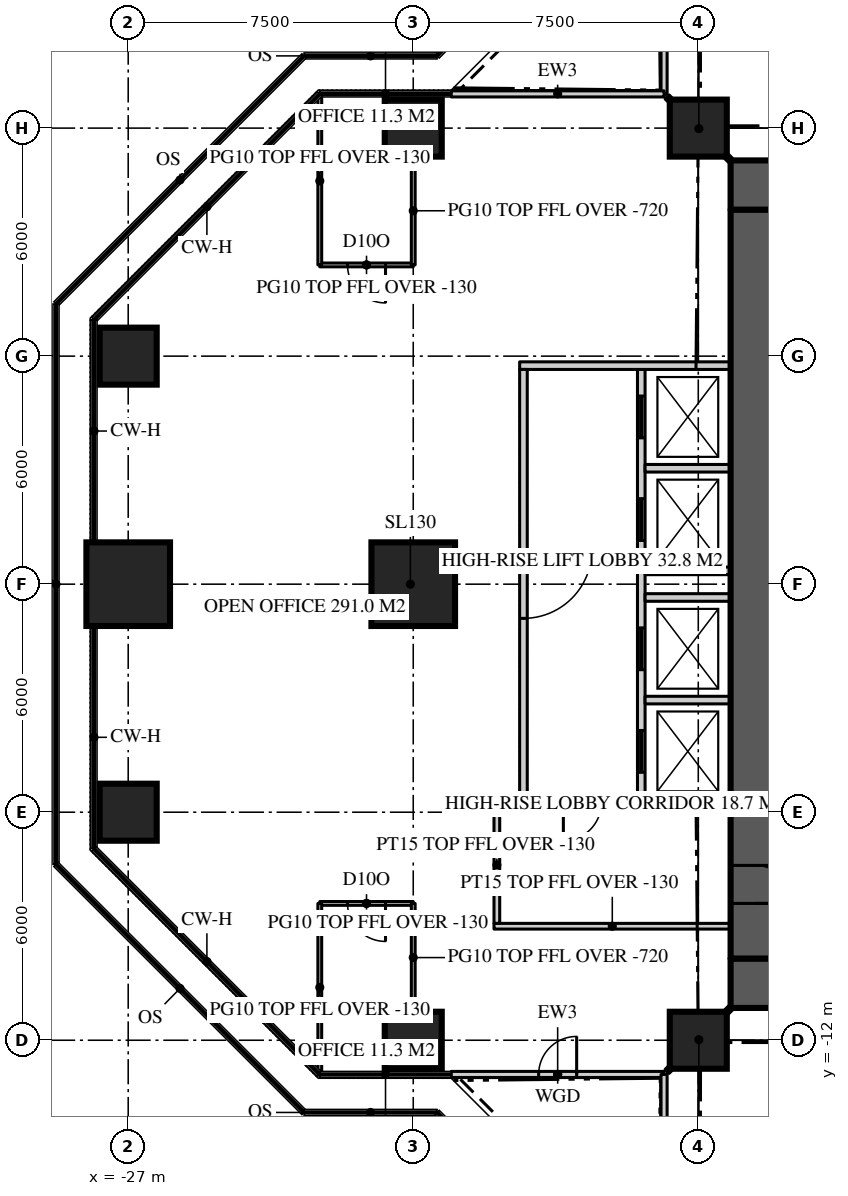
"""IFC4 building model, lengths in metres.
Left out: names, types, materials, properties, quantities, classifications, styles, units other than length and angle.
Written with IfcOpenShell. Run it as: python <this file> out.ifc"""

import sys

from ifc_helpers import new_model, si_unit, direction, frame, frame_2d, origin, origin_2d, place, context, subcontext, project, spatial, rectangle, extrude, element, fill, save


model = new_model("IFC4")
c1 = context("Model", 3, precision=1e-05, world=origin(), true_north=direction((0.0, 1.0)))
c2 = subcontext(c1, "Body", "Model", "MODEL_VIEW")
j1 = project(units=[si_unit("LENGTHUNIT", "METRE"), si_unit("PLANEANGLEUNIT", "RADIAN")], contexts=[c1])
p1 = place(None, origin())
s1 = spatial("IfcSite", under=j1, at=p1, CompositionType="ELEMENT")
p2 = place(p1, origin())
s2 = spatial("IfcBuilding", under=s1, at=p2, CompositionType="ELEMENT")
p3 = place(p2, frame((0.0, 0.0, 208.8)))
s3 = spatial("IfcBuildingStorey", under=s2, at=p3, CompositionType="ELEMENT", Elevation=208.8)
p4 = place(p3, frame((-11.15, 10.5, 0.0), z_axis=(0.0, 0.0, 1.0), x_axis=(1.0, 0.0, 0.0)))
e1 = element("IfcWall", 1, at=p4, inside=s3, PredefinedType="SHEAR", context=c2, shape_type="SweptSolid", body=[
    extrude(rectangle(XDim=22.3, YDim=1.3, at=frame_2d((11.15, 0.0))), origin(), (0.0, 0.0, 1.0), 3.9),
])
p5 = place(p4, frame((4.25, 0.0, 0.0)))
e2 = element("IfcOpeningElement", 2, at=p5, cuts=e1, PredefinedType="OPENING", context=c2, shape_type="SweptSolid", body=[
    extrude(rectangle(XDim=1.8, YDim=2.2, at=frame_2d((0.9, 1.1))), frame((0.0, 0.66, 0.0), z_axis=(0.0, -1.0, 0.0), x_axis=(1.0, 0.0, 0.0)), (0.0, 0.0, 1.0), 1.32),
])
p6 = place(p4, frame((16.25, 0.0, 0.0)))
e3 = element("IfcOpeningElement", 3, at=p6, cuts=e1, PredefinedType="OPENING", context=c2, shape_type="SweptSolid", body=[
    extrude(rectangle(XDim=1.8, YDim=2.2, at=frame_2d((0.9, 1.1))), frame((0.0, 0.66, 0.0), z_axis=(0.0, -1.0, 0.0), x_axis=(1.0, 0.0, 0.0)), (0.0, 0.0, 1.0), 1.32),
])
p7 = place(p3, frame((11.15, -10.5, 0.0), z_axis=(0.0, 0.0, 1.0), x_axis=(-1.0, 0.0, 0.0)))
e4 = element("IfcWall", 4, at=p7, inside=s3, PredefinedType="SHEAR", context=c2, shape_type="SweptSolid", body=[
    extrude(rectangle(XDim=22.3, YDim=1.3, at=frame_2d((11.15, 0.0))), origin(), (0.0, 0.0, 1.0), 3.9),
])
p8 = place(p7, frame((16.25, 0.0, 0.0)))
e5 = element("IfcOpeningElement", 5, at=p8, cuts=e4, PredefinedType="OPENING", context=c2, shape_type="SweptSolid", body=[
    extrude(rectangle(XDim=1.8, YDim=2.2, at=frame_2d((0.9, 1.1))), frame((0.0, 0.66, 0.0), z_axis=(0.0, -1.0, 0.0), x_axis=(1.0, 0.0, 0.0)), (0.0, 0.0, 1.0), 1.32),
])
p9 = place(p7, frame((4.25, 0.0, 0.0)))
e6 = element("IfcOpeningElement", 6, at=p9, cuts=e4, PredefinedType="OPENING", context=c2, shape_type="SweptSolid", body=[
    extrude(rectangle(XDim=1.8, YDim=2.2, at=frame_2d((0.9, 1.1))), frame((0.0, 0.66, 0.0), z_axis=(0.0, -1.0, 0.0), x_axis=(1.0, 0.0, 0.0)), (0.0, 0.0, 1.0), 1.32),
])
p10 = place(p3, frame((-10.5, 9.85, 0.0), z_axis=(0.0, 0.0, 1.0), x_axis=(0.0, -1.0, 0.0)))
e7 = element("IfcWall", 7, at=p10, inside=s3, PredefinedType="SHEAR", context=c2, shape_type="SweptSolid", body=[
    extrude(rectangle(XDim=19.7, YDim=1.3, at=frame_2d((9.85, 0.0))), origin(), (0.0, 0.0, 1.0), 3.9),
])
p11 = place(p10, frame((17.25, 0.0, 0.0)))
e8 = element("IfcOpeningElement", 8, at=p11, cuts=e7, PredefinedType="OPENING", context=c2, shape_type="SweptSolid", body=[
    extrude(rectangle(XDim=1.0, YDim=2.2, at=frame_2d((0.5, 1.1))), frame((0.0, 0.66, 0.0), z_axis=(0.0, -1.0, 0.0), x_axis=(1.0, 0.0, 0.0)), (0.0, 0.0, 1.0), 1.32),
])
for number, where, z_axis, x_axis in (
    (9, (-19.5, -12.0, 0.0), (0.0, 0.0, 1.0), (1.0, 0.0, 0.0)),
    (10, (-12.0, -12.0, 0.0), (0.0, 0.0, 1.0), (1.0, 0.0, 0.0)),
    (11, (-27.0, -6.0, 0.0), (0.0, 0.0, 1.0), (1.0, 0.0, 0.0)),
):
    element("IfcColumn", number, at=place(p3, frame(where, z_axis=z_axis, x_axis=x_axis)), inside=s3, PredefinedType="COLUMN", context=c2, shape_type="SweptSolid", body=[
        extrude(rectangle(XDim=1.5, YDim=1.5, at=origin_2d()), origin(), (0.0, 0.0, 1.0), 3.9),
    ])
for number, where, z_axis, x_axis in (
    (12, (-27.0, 0.0, 0.0), (0.0, 0.0, 1.0), (1.0, 0.0, 0.0)),
    (13, (-19.5, 0.0, 0.0), (0.0, 0.0, 1.0), (1.0, 0.0, 0.0)),
):
    element("IfcColumn", number, at=place(p3, frame(where, z_axis=z_axis, x_axis=x_axis)), inside=s3, PredefinedType="COLUMN", context=c2, shape_type="SweptSolid", body=[
        extrude(rectangle(XDim=2.2, YDim=2.2, at=origin_2d()), origin(), (0.0, 0.0, 1.0), 3.9),
    ])
for number, where, z_axis, x_axis in (
    (14, (-27.0, 6.0, 0.0), (0.0, 0.0, 1.0), (1.0, 0.0, 0.0)),
    (15, (-19.5, 12.0, 0.0), (0.0, 0.0, 1.0), (1.0, 0.0, 0.0)),
    (16, (-12.0, 12.0, 0.0), (0.0, 0.0, 1.0), (1.0, 0.0, 0.0)),
):
    element("IfcColumn", number, at=place(p3, frame(where, z_axis=z_axis, x_axis=x_axis)), inside=s3, PredefinedType="COLUMN", context=c2, shape_type="SweptSolid", body=[
        extrude(rectangle(XDim=1.5, YDim=1.5, at=origin_2d()), origin(), (0.0, 0.0, 1.0), 3.9),
    ])
p12 = place(p3, frame((-12.9, 18.5, 0.0), z_axis=(0.0, 0.0, 1.0), x_axis=(0.0, -1.0, 0.0)))
e17 = element("IfcWall", 17, at=p12, inside=s3, PredefinedType="SOLIDWALL", context=c2, shape_type="SweptSolid", body=[
    extrude(rectangle(XDim=5.6, YDim=0.16, at=frame_2d((2.8, 0.0))), origin(), (0.0, 0.0, 1.0), 3.77),
])
p13 = place(p12, frame((2.3, 0.0, 0.0)))
e18 = element("IfcOpeningElement", 18, at=p13, cuts=e17, PredefinedType="OPENING", context=c2, shape_type="SweptSolid", body=[
    extrude(rectangle(XDim=1.0, YDim=2.2, at=frame_2d((0.5, 1.1))), frame((0.0, 0.09, 0.0), z_axis=(0.0, -1.0, 0.0), x_axis=(1.0, 0.0, 0.0)), (0.0, 0.0, 1.0), 0.18),
])
p14 = place(p3, frame((-12.9, 12.9, 0.0), z_axis=(0.0, 0.0, 1.0), x_axis=(-1.0, 0.0, 0.0)))
e19 = element("IfcWall", 19, at=p14, inside=s3, PredefinedType="SOLIDWALL", context=c2, shape_type="SweptSolid", body=[
    extrude(rectangle(XDim=5.6, YDim=0.16, at=frame_2d((2.8, 0.0))), origin(), (0.0, 0.0, 1.0), 3.77),
])
p15 = place(p3, frame((-18.5, -12.9, 0.0), z_axis=(0.0, 0.0, 1.0), x_axis=(1.0, 0.0, 0.0)))
e20 = element("IfcWall", 20, at=p15, inside=s3, PredefinedType="SOLIDWALL", context=c2, shape_type="SweptSolid", body=[
    extrude(rectangle(XDim=5.6, YDim=0.16, at=frame_2d((2.8, 0.0))), origin(), (0.0, 0.0, 1.0), 3.77),
])
p16 = place(p15, frame((2.3, 0.0, 0.0)))
e21 = element("IfcOpeningElement", 21, at=p16, cuts=e20, PredefinedType="OPENING", context=c2, shape_type="SweptSolid", body=[
    extrude(rectangle(XDim=1.0, YDim=2.2, at=frame_2d((0.5, 1.1))), frame((0.0, 0.09, 0.0), z_axis=(0.0, -1.0, 0.0), x_axis=(1.0, 0.0, 0.0)), (0.0, 0.0, 1.0), 0.18),
])
p17 = place(p3, frame((-12.9, -12.9, 0.0), z_axis=(0.0, 0.0, 1.0), x_axis=(0.0, -1.0, 0.0)))
e22 = element("IfcWall", 22, at=p17, inside=s3, PredefinedType="SOLIDWALL", context=c2, shape_type="SweptSolid", body=[
    extrude(rectangle(XDim=5.6, YDim=0.16, at=frame_2d((2.8, 0.0))), origin(), (0.0, 0.0, 1.0), 3.77),
])
p18 = place(p3, frame((-19.5, -8.4, 0.0), z_axis=(0.0, 0.0, 1.0), x_axis=(-1.0, 0.0, 0.0)))
e23 = element("IfcWall", 23, at=p18, inside=s3, PredefinedType="PARTITIONING", context=c2, shape_type="SweptSolid", body=[
    extrude(rectangle(XDim=2.459, YDim=0.1, at=frame_2d((1.229, 0.0))), origin(), (0.0, 0.0, 1.0), 3.77),
])
p19 = place(p18, frame((0.729, 0.0, 0.0)))
e24 = element("IfcOpeningElement", 24, at=p19, cuts=e23, PredefinedType="OPENING", context=c2, shape_type="SweptSolid", body=[
    extrude(rectangle(XDim=1.0, YDim=2.2, at=frame_2d((0.5, 1.1))), frame((0.0, 0.06, 0.0), z_axis=(0.0, -1.0, 0.0), x_axis=(1.0, 0.0, 0.0)), (0.0, 0.0, 1.0), 0.12),
])
p20 = place(p3, frame((-19.5, -8.4, 0.0), z_axis=(0.0, 0.0, 1.0), x_axis=(0.0, -1.0, 0.0)))
e25 = element("IfcWall", 25, at=p20, inside=s3, PredefinedType="PARTITIONING", context=c2, shape_type="SweptSolid", body=[
    extrude(rectangle(XDim=2.85, YDim=0.1, at=frame_2d((1.425, 0.0))), origin(), (0.0, 0.0, 1.0), 3.18),
])
p21 = place(p3, frame((-21.959, -8.4, 0.0), z_axis=(0.0, 0.0, 1.0), x_axis=(0.0, -1.0, 0.0)))
e26 = element("IfcWall", 26, at=p21, inside=s3, PredefinedType="PARTITIONING", context=c2, shape_type="SweptSolid", body=[
    extrude(rectangle(XDim=4.42, YDim=0.1, at=frame_2d((2.21, 0.0))), origin(), (0.0, 0.0, 1.0), 3.77),
])
p22 = place(p3, frame((-19.5, 8.4, 0.0), z_axis=(0.0, 0.0, 1.0), x_axis=(-1.0, 0.0, 0.0)))
e27 = element("IfcWall", 27, at=p22, inside=s3, PredefinedType="PARTITIONING", context=c2, shape_type="SweptSolid", body=[
    extrude(rectangle(XDim=2.459, YDim=0.1, at=frame_2d((1.229, 0.0))), origin(), (0.0, 0.0, 1.0), 3.77),
])
p23 = place(p22, frame((0.729, 0.0, 0.0)))
e28 = element("IfcOpeningElement", 28, at=p23, cuts=e27, PredefinedType="OPENING", context=c2, shape_type="SweptSolid", body=[
    extrude(rectangle(XDim=1.0, YDim=2.2, at=frame_2d((0.5, 1.1))), frame((0.0, 0.06, 0.0), z_axis=(0.0, -1.0, 0.0), x_axis=(1.0, 0.0, 0.0)), (0.0, 0.0, 1.0), 0.12),
])
p24 = place(p3, frame((-19.5, 8.4, 0.0), z_axis=(0.0, 0.0, 1.0), x_axis=(0.0, 1.0, 0.0)))
e29 = element("IfcWall", 29, at=p24, inside=s3, PredefinedType="PARTITIONING", context=c2, shape_type="SweptSolid", body=[
    extrude(rectangle(XDim=2.85, YDim=0.1, at=frame_2d((1.425, 0.0))), origin(), (0.0, 0.0, 1.0), 3.18),
])
p25 = place(p3, frame((-21.959, 8.4, 0.0), z_axis=(0.0, 0.0, 1.0), x_axis=(0.0, 1.0, 0.0)))
e30 = element("IfcWall", 30, at=p25, inside=s3, PredefinedType="PARTITIONING", context=c2, shape_type="SweptSolid", body=[
    extrude(rectangle(XDim=4.42, YDim=0.1, at=frame_2d((2.21, 0.0))), origin(), (0.0, 0.0, 1.0), 3.77),
])
p26 = place(p3, frame((-13.5, 5.65, 0.0), z_axis=(0.0, 0.0, 1.0), x_axis=(0.0, -1.0, 0.0)))
e31 = element("IfcWall", 31, at=p26, inside=s3, PredefinedType="SOLIDWALL", context=c2, shape_type="SweptSolid", body=[
    extrude(rectangle(XDim=11.3, YDim=0.2, at=frame_2d((5.65, 0.0))), origin(), (0.0, 0.0, 1.0), 3.7),
])
p27 = place(p26, frame((0.7, 0.0, 0.0)))
e32 = element("IfcOpeningElement", 32, at=p27, cuts=e31, PredefinedType="OPENING", context=c2, shape_type="SweptSolid", body=[
    extrude(rectangle(XDim=1.1, YDim=2.2, at=frame_2d((0.55, 1.1))), frame((0.0, 0.11, 0.0), z_axis=(0.0, -1.0, 0.0), x_axis=(1.0, 0.0, 0.0)), (0.0, 0.0, 1.0), 0.22),
])
p28 = place(p26, frame((3.4, 0.0, 0.0)))
e33 = element("IfcOpeningElement", 33, at=p28, cuts=e31, PredefinedType="OPENING", context=c2, shape_type="SweptSolid", body=[
    extrude(rectangle(XDim=1.1, YDim=2.2, at=frame_2d((0.55, 1.1))), frame((0.0, 0.11, 0.0), z_axis=(0.0, -1.0, 0.0), x_axis=(1.0, 0.0, 0.0)), (0.0, 0.0, 1.0), 0.22),
])
p29 = place(p26, frame((6.8, 0.0, 0.0)))
e34 = element("IfcOpeningElement", 34, at=p29, cuts=e31, PredefinedType="OPENING", context=c2, shape_type="SweptSolid", body=[
    extrude(rectangle(XDim=1.1, YDim=2.2, at=frame_2d((0.55, 1.1))), frame((0.0, 0.11, 0.0), z_axis=(0.0, -1.0, 0.0), x_axis=(1.0, 0.0, 0.0)), (0.0, 0.0, 1.0), 0.22),
])
p30 = place(p26, frame((9.5, 0.0, 0.0)))
e35 = element("IfcOpeningElement", 35, at=p30, cuts=e31, PredefinedType="OPENING", context=c2, shape_type="SweptSolid", body=[
    extrude(rectangle(XDim=1.1, YDim=2.2, at=frame_2d((0.55, 1.1))), frame((0.0, 0.11, 0.0), z_axis=(0.0, -1.0, 0.0), x_axis=(1.0, 0.0, 0.0)), (0.0, 0.0, 1.0), 0.22),
])
p31 = place(p3, frame((-11.15, 5.75, 0.0), z_axis=(0.0, 0.0, 1.0), x_axis=(-1.0, 0.0, 0.0)))
e36 = element("IfcWall", 36, at=p31, inside=s3, PredefinedType="SOLIDWALL", context=c2, shape_type="SweptSolid", body=[
    extrude(rectangle(XDim=5.55, YDim=0.2, at=frame_2d((2.775, 0.0))), origin(), (0.0, 0.0, 1.0), 3.7),
])
p32 = place(p3, frame((-11.15, -5.75, 0.0), z_axis=(0.0, 0.0, 1.0), x_axis=(-1.0, 0.0, 0.0)))
e37 = element("IfcWall", 37, at=p32, inside=s3, PredefinedType="SOLIDWALL", context=c2, shape_type="SweptSolid", body=[
    extrude(rectangle(XDim=5.55, YDim=0.2, at=frame_2d((2.775, 0.0))), origin(), (0.0, 0.0, 1.0), 3.7),
])
p33 = place(p32, frame((3.4, 0.0, 0.0)))
e38 = element("IfcOpeningElement", 38, at=p33, cuts=e37, PredefinedType="OPENING", context=c2, shape_type="SweptSolid", body=[
    extrude(rectangle(XDim=1.0, YDim=2.2, at=frame_2d((0.5, 1.1))), frame((0.0, 0.11, 0.0), z_axis=(0.0, -1.0, 0.0), x_axis=(1.0, 0.0, 0.0)), (0.0, 0.0, 1.0), 0.22),
])
for number, where, z_axis, x_axis in (
    (39, (-11.15, 3.05, 0.0), (0.0, 0.0, 1.0), (-1.0, 0.0, 0.0)),
    (40, (-11.15, 0.35, 0.0), (0.0, 0.0, 1.0), (-1.0, 0.0, 0.0)),
    (41, (-11.15, -0.35, 0.0), (0.0, 0.0, 1.0), (-1.0, 0.0, 0.0)),
    (42, (-11.15, -3.05, 0.0), (0.0, 0.0, 1.0), (-1.0, 0.0, 0.0)),
):
    element("IfcWall", number, at=place(p3, frame(where, z_axis=z_axis, x_axis=x_axis)), inside=s3, PredefinedType="SOLIDWALL", context=c2, shape_type="SweptSolid", body=[
        extrude(rectangle(XDim=2.25, YDim=0.2, at=frame_2d((1.125, 0.0))), origin(), (0.0, 0.0, 1.0), 3.7),
    ])
p34 = place(p3, frame((-16.6, 5.65, 0.0), z_axis=(0.0, 0.0, 1.0), x_axis=(0.0, -1.0, 0.0)))
e43 = element("IfcWall", 43, at=p34, inside=s3, PredefinedType="SOLIDWALL", context=c2, shape_type="SweptSolid", body=[
    extrude(rectangle(XDim=11.3, YDim=0.2, at=frame_2d((5.65, 0.0))), origin(), (0.0, 0.0, 1.0), 3.18),
])
p35 = place(p34, frame((4.75, 0.0, 0.0)))
e44 = element("IfcOpeningElement", 44, at=p35, cuts=e43, PredefinedType="OPENING", context=c2, shape_type="SweptSolid", body=[
    extrude(rectangle(XDim=1.8, YDim=2.2, at=frame_2d((0.9, 1.1))), frame((0.0, 0.11, 0.0), z_axis=(0.0, -1.0, 0.0), x_axis=(1.0, 0.0, 0.0)), (0.0, 0.0, 1.0), 0.22),
])
for number, where, z_axis, x_axis in (
    (45, (-11.15, 11.15, 0.0), (0.0, 0.0, 1.0), (-0.707, 0.707, 0.0)),
    (46, (-11.15, -11.15, 0.0), (0.0, 0.0, 1.0), (-0.707, -0.707, 0.0)),
):
    element("IfcWall", number, at=place(p3, frame(where, z_axis=z_axis, x_axis=x_axis)), inside=s3, PredefinedType="PARTITIONING", context=c2, shape_type="SweptSolid", body=[
        extrude(rectangle(XDim=2.362, YDim=0.15, at=frame_2d((1.181, 0.0))), origin(), (0.0, 0.0, 1.0), 3.22),
    ])
p36 = place(p3, frame((-11.15, -9.0, 0.0), z_axis=(0.0, 0.0, 1.0), x_axis=(-1.0, 0.0, 0.0)))
e47 = element("IfcWall", 47, at=p36, inside=s3, PredefinedType="PARTITIONING", context=c2, shape_type="SweptSolid", body=[
    extrude(rectangle(XDim=6.225, YDim=0.15, at=frame_2d((3.113, 0.0))), origin(), (0.0, 0.0, 1.0), 3.77),
])
p37 = place(p3, frame((-17.3, -5.85, 0.0), z_axis=(0.0, 0.0, 1.0), x_axis=(0.0, -1.0, 0.0)))
e48 = element("IfcWall", 48, at=p37, inside=s3, PredefinedType="PARTITIONING", context=c2, shape_type="SweptSolid", body=[
    extrude(rectangle(XDim=3.075, YDim=0.15, at=frame_2d((1.538, 0.0))), origin(), (0.0, 0.0, 1.0), 3.77),
])
p38 = place(p16, origin())
e49 = element("IfcDoor", 49, at=p38, inside=s3, OperationType="SINGLE_SWING_RIGHT", PredefinedType="DOOR", context=c2, shape_type="SweptSolid", body=[
    extrude(rectangle(XDim=1.0, YDim=2.2, at=frame_2d((0.5, 1.1))), frame((0.0, 0.025, 0.0), z_axis=(0.0, -1.0, 0.0), x_axis=(1.0, 0.0, 0.0)), (0.0, 0.0, 1.0), 0.05),
])
fill(e21, e49)
p39 = place(p11, origin())
e50 = element("IfcDoor", 50, at=p39, inside=s3, OperationType="SINGLE_SWING_RIGHT", PredefinedType="DOOR", context=c2, shape_type="SweptSolid", body=[
    extrude(rectangle(XDim=1.0, YDim=2.2, at=frame_2d((0.5, 1.1))), frame((0.0, 0.025, 0.0), z_axis=(0.0, -1.0, 0.0), x_axis=(1.0, 0.0, 0.0)), (0.0, 0.0, 1.0), 0.05),
])
fill(e8, e50)
p40 = place(p19, origin())
e51 = element("IfcDoor", 51, at=p40, inside=s3, OperationType="SINGLE_SWING_LEFT", PredefinedType="DOOR", context=c2, shape_type="SweptSolid", body=[
    extrude(rectangle(XDim=1.0, YDim=2.2, at=frame_2d((0.5, 1.1))), frame((0.0, 0.025, 0.0), z_axis=(0.0, -1.0, 0.0), x_axis=(1.0, 0.0, 0.0)), (0.0, 0.0, 1.0), 0.05),
])
fill(e24, e51)
p41 = place(p23, origin())
e52 = element("IfcDoor", 52, at=p41, inside=s3, OperationType="SINGLE_SWING_LEFT", PredefinedType="DOOR", context=c2, shape_type="SweptSolid", body=[
    extrude(rectangle(XDim=1.0, YDim=2.2, at=frame_2d((0.5, 1.1))), frame((0.0, 0.025, 0.0), z_axis=(0.0, -1.0, 0.0), x_axis=(1.0, 0.0, 0.0)), (0.0, 0.0, 1.0), 0.05),
])
fill(e28, e52)
p42 = place(p35, origin())
e53 = element("IfcDoor", 53, at=p42, inside=s3, OperationType="DOUBLE_DOOR_DOUBLE_SWING", PredefinedType="DOOR", context=c2, shape_type="SweptSolid", body=[
    extrude(rectangle(XDim=1.8, YDim=2.2, at=frame_2d((0.9, 1.1))), frame((0.0, 0.025, 0.0), z_axis=(0.0, -1.0, 0.0), x_axis=(1.0, 0.0, 0.0)), (0.0, 0.0, 1.0), 0.05),
])
fill(e44, e53)
p43 = place(p27, origin())
e54 = element("IfcDoor", 54, at=p43, inside=s3, OperationType="SLIDING_TO_LEFT", PredefinedType="DOOR", context=c2, shape_type="SweptSolid", body=[
    extrude(rectangle(XDim=1.1, YDim=2.2, at=frame_2d((0.55, 1.1))), frame((0.0, 0.025, 0.0), z_axis=(0.0, -1.0, 0.0), x_axis=(1.0, 0.0, 0.0)), (0.0, 0.0, 1.0), 0.05),
])
fill(e32, e54)
p44 = place(p28, origin())
e55 = element("IfcDoor", 55, at=p44, inside=s3, OperationType="SLIDING_TO_LEFT", PredefinedType="DOOR", context=c2, shape_type="SweptSolid", body=[
    extrude(rectangle(XDim=1.1, YDim=2.2, at=frame_2d((0.55, 1.1))), frame((0.0, 0.025, 0.0), z_axis=(0.0, -1.0, 0.0), x_axis=(1.0, 0.0, 0.0)), (0.0, 0.0, 1.0), 0.05),
])
fill(e33, e55)
p45 = place(p29, origin())
e56 = element("IfcDoor", 56, at=p45, inside=s3, OperationType="SLIDING_TO_LEFT", PredefinedType="DOOR", context=c2, shape_type="SweptSolid", body=[
    extrude(rectangle(XDim=1.1, YDim=2.2, at=frame_2d((0.55, 1.1))), frame((0.0, 0.025, 0.0), z_axis=(0.0, -1.0, 0.0), x_axis=(1.0, 0.0, 0.0)), (0.0, 0.0, 1.0), 0.05),
])
fill(e34, e56)
p46 = place(p30, origin())
e57 = element("IfcDoor", 57, at=p46, inside=s3, OperationType="SLIDING_TO_LEFT", PredefinedType="DOOR", context=c2, shape_type="SweptSolid", body=[
    extrude(rectangle(XDim=1.1, YDim=2.2, at=frame_2d((0.55, 1.1))), frame((0.0, 0.025, 0.0), z_axis=(0.0, -1.0, 0.0), x_axis=(1.0, 0.0, 0.0)), (0.0, 0.0, 1.0), 0.05),
])
fill(e35, e57)
p47 = place(p33, origin())
e58 = element("IfcDoor", 58, at=p47, inside=s3, OperationType="SINGLE_SWING_RIGHT", PredefinedType="DOOR", context=c2, shape_type="SweptSolid", body=[
    extrude(rectangle(XDim=1.0, YDim=2.2, at=frame_2d((0.5, 1.1))), frame((0.0, 0.025, 0.0), z_axis=(0.0, -1.0, 0.0), x_axis=(1.0, 0.0, 0.0)), (0.0, 0.0, 1.0), 0.05),
])
fill(e38, e58)
save(model, sys.argv[1])
